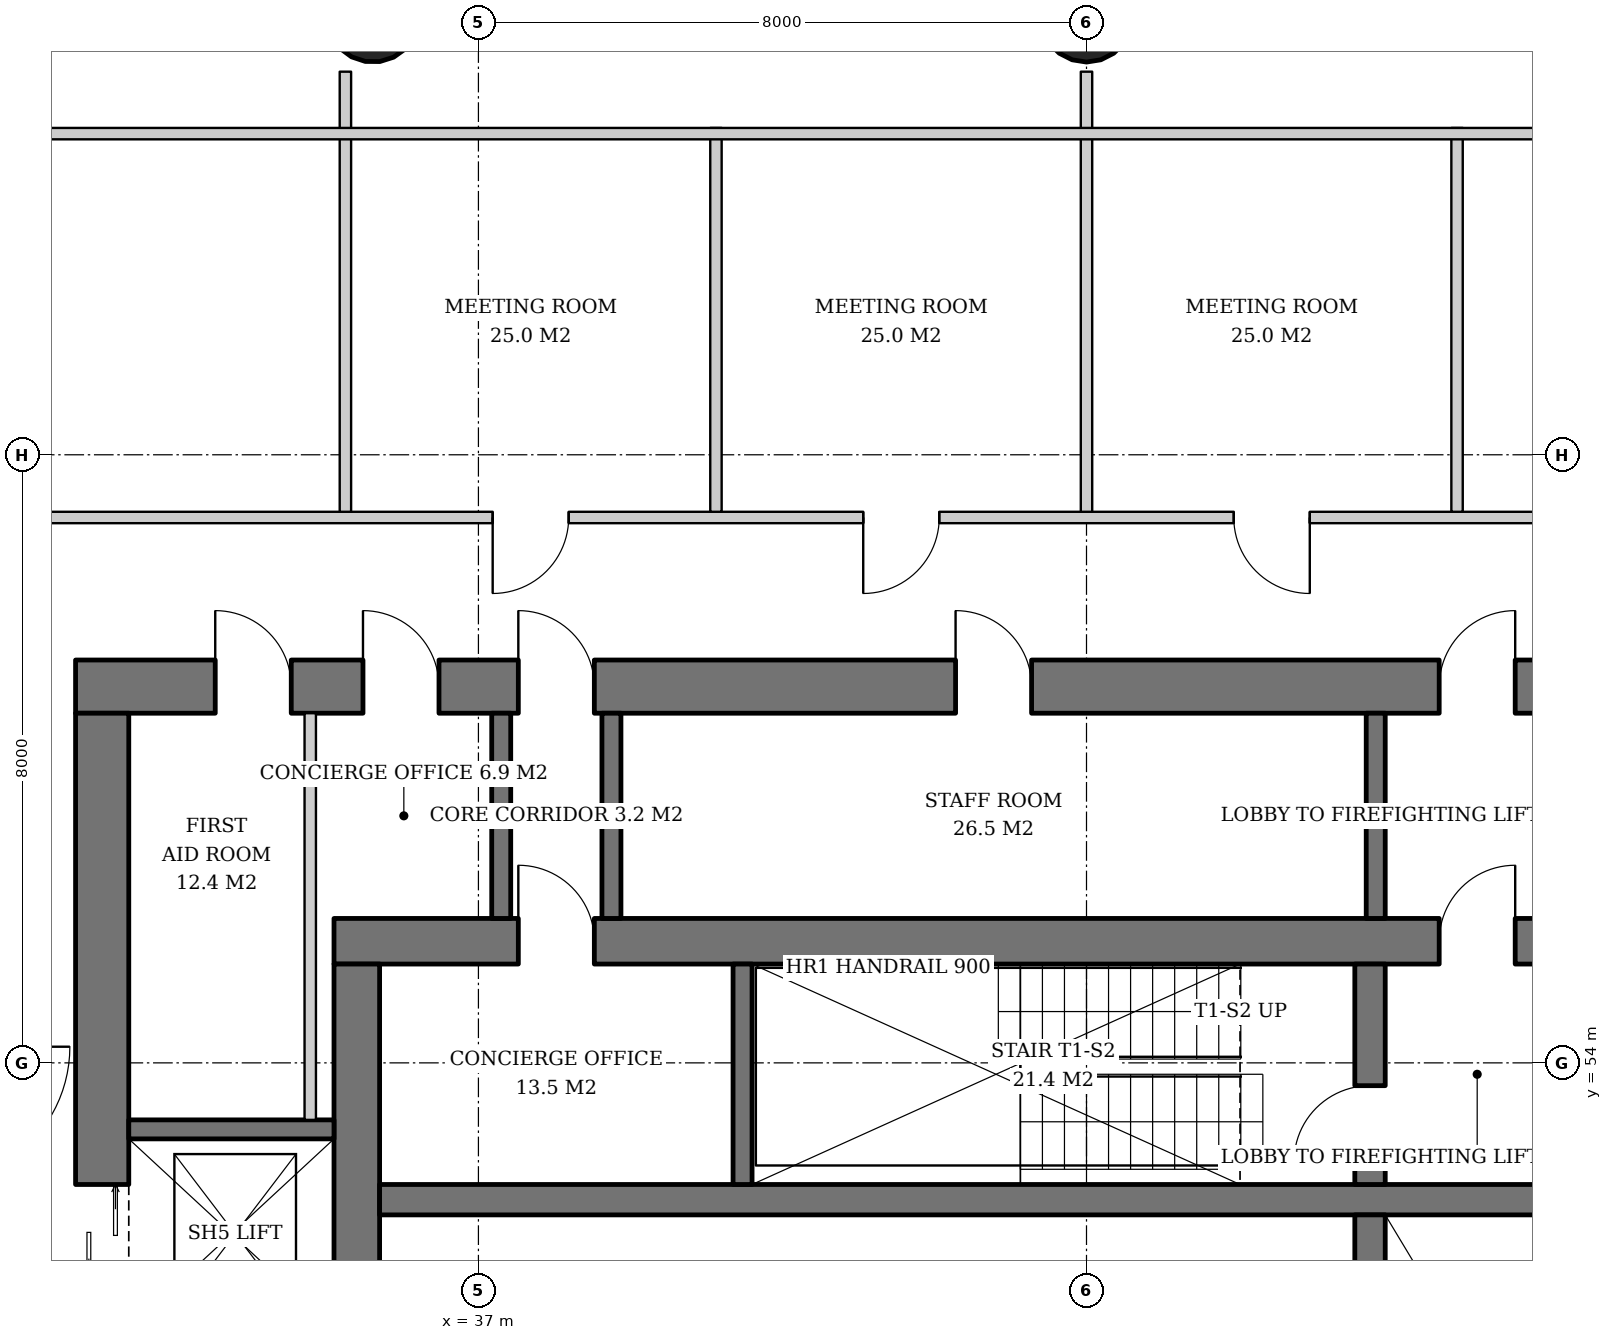
"""IFC4 building model, lengths in metres.
Left out: names, types, materials, properties, quantities, classifications, styles, units other than length and angle.
Written with IfcOpenShell. Run it as: python <this file> out.ifc"""

import sys

from ifc_helpers import new_model, si_unit, direction, frame, frame_2d, origin, origin_2d, place, context, subcontext, project, spatial, rectangle, hollow_circle, extrude, element, fill, save


model = new_model("IFC4")
c1 = context("Model", 3, precision=1e-05, world=origin(), true_north=direction((0.0, 1.0)))
c2 = subcontext(c1, "Body", "Model", "MODEL_VIEW")
j1 = project(units=[si_unit("LENGTHUNIT", "METRE"), si_unit("PLANEANGLEUNIT", "RADIAN")], contexts=[c1])
p1 = place(None, origin())
s1 = spatial("IfcSite", under=j1, at=p1, CompositionType="ELEMENT")
p2 = place(p1, origin())
s2 = spatial("IfcBuilding", under=s1, at=p2, CompositionType="ELEMENT")
p3 = place(p2, frame((0.0, 0.0, 89.4)))
s3 = spatial("IfcBuildingStorey", under=s2, at=p3, CompositionType="ELEMENT", Elevation=89.4)
p4 = place(p3, frame((45.0, 67.814, 0.0), z_axis=(0.0, -0.031914348339, 0.999490607445), x_axis=(1.0, 0.0, 0.0)))
e1 = element("IfcColumn", 1, at=p4, inside=s3, PredefinedType="COLUMN", context=c2, shape_type="SweptSolid", body=[
    extrude(hollow_circle(Radius=0.61, WallThickness=0.04, at=origin_2d()), origin(), (0.0, 0.0, 1.0), 3.802),
])
p5 = place(p3, frame((35.593, 67.814, 0.0), z_axis=(0.015987237665, -0.031910269556, 0.999362868496), x_axis=(0.894067115991, 0.447933021895, 0.0)))
e2 = element("IfcColumn", 2, at=p5, inside=s3, PredefinedType="COLUMN", context=c2, shape_type="SweptSolid", body=[
    extrude(hollow_circle(Radius=0.61, WallThickness=0.04, at=origin_2d()), origin(), (0.0, 0.0, 1.0), 3.802),
])
p6 = place(p3, frame((35.1, 55.6, 0.0), z_axis=(0.0, 0.0, 1.0), x_axis=(1.0, 0.0, 0.0)))
e3 = element("IfcWall", 3, at=p6, inside=s3, PredefinedType="SHEAR", context=c2, shape_type="SweptSolid", body=[
    extrude(rectangle(XDim=19.8, YDim=0.6, at=frame_2d((9.9, 0.0))), origin(), (0.0, 0.0, 1.0), 3.8),
])
p7 = place(p6, frame((14.54, 0.0, 0.0)))
e4 = element("IfcOpeningElement", 4, at=p7, cuts=e3, PredefinedType="OPENING", context=c2, shape_type="SweptSolid", body=[
    extrude(rectangle(XDim=1.0, YDim=2.1, at=frame_2d((0.5, 1.05))), frame((0.0, 0.31, 0.0), z_axis=(0.0, -1.0, 0.0), x_axis=(1.0, 0.0, 0.0)), (0.0, 0.0, 1.0), 0.62),
])
p8 = place(p6, frame((2.425, 0.0, 0.0)))
e5 = element("IfcOpeningElement", 5, at=p8, cuts=e3, PredefinedType="OPENING", context=c2, shape_type="SweptSolid", body=[
    extrude(rectangle(XDim=1.0, YDim=2.1, at=frame_2d((0.5, 1.05))), frame((0.0, 0.31, 0.0), z_axis=(0.0, -1.0, 0.0), x_axis=(1.0, 0.0, 0.0)), (0.0, 0.0, 1.0), 0.62),
])
p9 = place(p3, frame((35.4, 36.7, 0.0), z_axis=(0.0, 0.0, 1.0), x_axis=(0.0, 1.0, 0.0)))
e6 = element("IfcWall", 6, at=p9, inside=s3, PredefinedType="SHEAR", context=c2, shape_type="SweptSolid", body=[
    extrude(rectangle(XDim=18.6, YDim=0.6, at=frame_2d((9.3, 0.0))), origin(), (0.0, 0.0, 1.0), 3.8),
])
p10 = place(p9, frame((8.4, 0.0, 0.0)))
e7 = element("IfcOpeningElement", 7, at=p10, cuts=e6, PredefinedType="OPENING", context=c2, shape_type="SweptSolid", body=[
    extrude(rectangle(XDim=1.8, YDim=2.4, at=frame_2d((0.9, 1.2))), frame((0.0, 0.31, 0.0), z_axis=(0.0, -1.0, 0.0), x_axis=(1.0, 0.0, 0.0)), (0.0, 0.0, 1.0), 0.62),
])
p11 = place(p3, frame((31.7, 58.95, 0.0), z_axis=(0.0, 0.0, 1.0), x_axis=(1.0, 0.0, 0.0)))
e8 = element("IfcWall", 8, at=p11, inside=s3, PredefinedType="SHEAR", context=c2, shape_type="SweptSolid", body=[
    extrude(rectangle(XDim=26.6, YDim=0.7, at=frame_2d((13.3, 0.0))), origin(), (0.0, 0.0, 1.0), 3.8),
])
p12 = place(p11, frame((17.94, 0.0, 0.0)))
e9 = element("IfcOpeningElement", 9, at=p12, cuts=e8, PredefinedType="OPENING", context=c2, shape_type="SweptSolid", body=[
    extrude(rectangle(XDim=1.0, YDim=2.1, at=frame_2d((0.5, 1.05))), frame((0.0, 0.36, 0.0), z_axis=(0.0, -1.0, 0.0), x_axis=(1.0, 0.0, 0.0)), (0.0, 0.0, 1.0), 0.72),
])
p13 = place(p11, frame((5.825, 0.0, 0.0)))
e10 = element("IfcOpeningElement", 10, at=p13, cuts=e8, PredefinedType="OPENING", context=c2, shape_type="SweptSolid", body=[
    extrude(rectangle(XDim=1.0, YDim=2.1, at=frame_2d((0.5, 1.05))), frame((0.0, 0.36, 0.0), z_axis=(0.0, -1.0, 0.0), x_axis=(1.0, 0.0, 0.0)), (0.0, 0.0, 1.0), 0.72),
])
p14 = place(p11, frame((1.837, 0.0, 0.0)))
e11 = element("IfcOpeningElement", 11, at=p14, cuts=e8, PredefinedType="OPENING", context=c2, shape_type="SweptSolid", body=[
    extrude(rectangle(XDim=1.0, YDim=2.1, at=frame_2d((0.5, 1.05))), frame((0.0, 0.36, 0.0), z_axis=(0.0, -1.0, 0.0), x_axis=(1.0, 0.0, 0.0)), (0.0, 0.0, 1.0), 0.72),
])
p15 = place(p11, frame((3.781, 0.0, 0.0)))
e12 = element("IfcOpeningElement", 12, at=p15, cuts=e8, PredefinedType="OPENING", context=c2, shape_type="SweptSolid", body=[
    extrude(rectangle(XDim=1.0, YDim=2.1, at=frame_2d((0.5, 1.05))), frame((0.0, 0.36, 0.0), z_axis=(0.0, -1.0, 0.0), x_axis=(1.0, 0.0, 0.0)), (0.0, 0.0, 1.0), 0.72),
])
p16 = place(p11, frame((11.577, 0.0, 0.0)))
e13 = element("IfcOpeningElement", 13, at=p16, cuts=e8, PredefinedType="OPENING", context=c2, shape_type="SweptSolid", body=[
    extrude(rectangle(XDim=1.0, YDim=2.1, at=frame_2d((0.5, 1.05))), frame((0.0, 0.36, 0.0), z_axis=(0.0, -1.0, 0.0), x_axis=(1.0, 0.0, 0.0)), (0.0, 0.0, 1.0), 0.72),
])
p17 = place(p11, frame((20.9, 0.0, 0.0)))
e14 = element("IfcOpeningElement", 14, at=p17, cuts=e8, PredefinedType="OPENING", context=c2, shape_type="SweptSolid", body=[
    extrude(rectangle(XDim=1.0, YDim=2.1, at=frame_2d((0.5, 1.05))), frame((0.0, 0.36, 0.0), z_axis=(0.0, -1.0, 0.0), x_axis=(1.0, 0.0, 0.0)), (0.0, 0.0, 1.0), 0.72),
])
p18 = place(p11, frame((23.75, 0.0, 0.0)))
e15 = element("IfcOpeningElement", 15, at=p18, cuts=e8, PredefinedType="OPENING", context=c2, shape_type="SweptSolid", body=[
    extrude(rectangle(XDim=1.0, YDim=2.1, at=frame_2d((0.5, 1.05))), frame((0.0, 0.36, 0.0), z_axis=(0.0, -1.0, 0.0), x_axis=(1.0, 0.0, 0.0)), (0.0, 0.0, 1.0), 0.72),
])
p19 = place(p3, frame((32.05, 33.4, 0.0), z_axis=(0.0, 0.0, 1.0), x_axis=(0.0, 1.0, 0.0)))
e16 = element("IfcWall", 16, at=p19, inside=s3, PredefinedType="SHEAR", context=c2, shape_type="SweptSolid", body=[
    extrude(rectangle(XDim=25.2, YDim=0.7, at=frame_2d((12.6, 0.0))), origin(), (0.0, 0.0, 1.0), 3.8),
])
p20 = place(p19, frame((3.45, 0.0, 0.0)))
e17 = element("IfcOpeningElement", 17, at=p20, cuts=e16, PredefinedType="OPENING", context=c2, shape_type="SweptSolid", body=[
    extrude(rectangle(XDim=1.3, YDim=2.2, at=frame_2d((0.65, 1.1))), frame((0.0, 0.36, 0.0), z_axis=(0.0, -1.0, 0.0), x_axis=(1.0, 0.0, 0.0)), (0.0, 0.0, 1.0), 0.72),
])
p21 = place(p19, frame((6.2, 0.0, 0.0)))
e18 = element("IfcOpeningElement", 18, at=p21, cuts=e16, PredefinedType="OPENING", context=c2, shape_type="SweptSolid", body=[
    extrude(rectangle(XDim=1.3, YDim=2.2, at=frame_2d((0.65, 1.1))), frame((0.0, 0.36, 0.0), z_axis=(0.0, -1.0, 0.0), x_axis=(1.0, 0.0, 0.0)), (0.0, 0.0, 1.0), 0.72),
])
p22 = place(p19, frame((8.95, 0.0, 0.0)))
e19 = element("IfcOpeningElement", 19, at=p22, cuts=e16, PredefinedType="OPENING", context=c2, shape_type="SweptSolid", body=[
    extrude(rectangle(XDim=1.3, YDim=2.2, at=frame_2d((0.65, 1.1))), frame((0.0, 0.36, 0.0), z_axis=(0.0, -1.0, 0.0), x_axis=(1.0, 0.0, 0.0)), (0.0, 0.0, 1.0), 0.72),
])
p23 = place(p19, frame((14.95, 0.0, 0.0)))
e20 = element("IfcOpeningElement", 20, at=p23, cuts=e16, PredefinedType="OPENING", context=c2, shape_type="SweptSolid", body=[
    extrude(rectangle(XDim=1.3, YDim=2.2, at=frame_2d((0.65, 1.1))), frame((0.0, 0.36, 0.0), z_axis=(0.0, -1.0, 0.0), x_axis=(1.0, 0.0, 0.0)), (0.0, 0.0, 1.0), 0.72),
])
p24 = place(p19, frame((17.7, 0.0, 0.0)))
e21 = element("IfcOpeningElement", 21, at=p24, cuts=e16, PredefinedType="OPENING", context=c2, shape_type="SweptSolid", body=[
    extrude(rectangle(XDim=1.3, YDim=2.2, at=frame_2d((0.65, 1.1))), frame((0.0, 0.36, 0.0), z_axis=(0.0, -1.0, 0.0), x_axis=(1.0, 0.0, 0.0)), (0.0, 0.0, 1.0), 0.72),
])
p25 = place(p19, frame((11.7, 0.0, 0.0)))
e22 = element("IfcOpeningElement", 22, at=p25, cuts=e16, PredefinedType="OPENING", context=c2, shape_type="SweptSolid", body=[
    extrude(rectangle(XDim=1.8, YDim=2.4, at=frame_2d((0.9, 1.2))), frame((0.0, 0.36, 0.0), z_axis=(0.0, -1.0, 0.0), x_axis=(1.0, 0.0, 0.0)), (0.0, 0.0, 1.0), 0.72),
])
p26 = place(p3, frame((35.7, 52.2, 0.0), z_axis=(0.0, 0.0, 1.0), x_axis=(1.0, 0.0, 0.0)))
e23 = element("IfcWall", 23, at=p26, inside=s3, PredefinedType="SHEAR", context=c2, shape_type="SweptSolid", body=[
    extrude(rectangle(XDim=18.6, YDim=0.4, at=frame_2d((9.3, 0.0))), origin(), (0.0, 0.0, 1.0), 3.8),
])
p27 = place(p3, frame((48.73, 40.0, 0.0), z_axis=(0.0, 0.0, 1.0), x_axis=(0.0, 1.0, 0.0)))
e24 = element("IfcWall", 24, at=p27, inside=s3, PredefinedType="SHEAR", context=c2, shape_type="SweptSolid", body=[
    extrude(rectangle(XDim=12.0, YDim=0.4, at=frame_2d((6.0, 0.0))), origin(), (0.0, 0.0, 1.0), 3.8),
])
p28 = place(p3, frame((48.73, 52.4, 0.0), z_axis=(0.0, 0.0, 1.0), x_axis=(0.0, 1.0, 0.0)))
e25 = element("IfcWall", 25, at=p28, inside=s3, PredefinedType="SHEAR", context=c2, shape_type="SweptSolid", body=[
    extrude(rectangle(XDim=2.9, YDim=0.4, at=frame_2d((1.45, 0.0))), origin(), (0.0, 0.0, 1.0), 3.8),
])
p29 = place(p28, frame((0.3, 0.0, 0.0)))
e26 = element("IfcOpeningElement", 26, at=p29, cuts=e25, PredefinedType="OPENING", context=c2, shape_type="SweptSolid", body=[
    extrude(rectangle(XDim=1.0, YDim=2.1, at=frame_2d((0.5, 1.05))), frame((0.0, 0.21, 0.0), z_axis=(0.0, -1.0, 0.0), x_axis=(1.0, 0.0, 0.0)), (0.0, 0.0, 1.0), 0.42),
])
p30 = place(p3, frame((40.475, 52.4, 0.0), z_axis=(0.0, 0.0, 1.0), x_axis=(0.0, 1.0, 0.0)))
e27 = element("IfcWall", 27, at=p30, inside=s3, PredefinedType="SHEAR", context=c2, shape_type="SweptSolid", body=[
    extrude(rectangle(XDim=2.9, YDim=0.25, at=frame_2d((1.45, 0.0))), origin(), (0.0, 0.0, 1.0), 3.8),
])
p31 = place(p3, frame((32.4, 53.125, 0.0), z_axis=(0.0, 0.0, 1.0), x_axis=(1.0, 0.0, 0.0)))
e28 = element("IfcWall", 28, at=p31, inside=s3, PredefinedType="SHEAR", context=c2, shape_type="SweptSolid", body=[
    extrude(rectangle(XDim=2.7, YDim=0.25, at=frame_2d((1.35, 0.0))), origin(), (0.0, 0.0, 1.0), 3.8),
])
for number, where, z_axis, x_axis in (
    (29, (48.805, 55.9, 0.0), (0.0, 0.0, 1.0), (0.0, 1.0, 0.0)),
    (30, (37.3, 55.9, 0.0), (0.0, 0.0, 1.0), (0.0, 1.0, 0.0)),
    (31, (38.75, 55.9, 0.0), (0.0, 0.0, 1.0), (0.0, 1.0, 0.0)),
):
    element("IfcWall", number, at=place(p3, frame(where, z_axis=z_axis, x_axis=x_axis)), inside=s3, PredefinedType="SOLIDWALL", context=c2, shape_type="SweptSolid", body=[
        extrude(rectangle(XDim=2.7, YDim=0.25, at=frame_2d((1.35, 0.0))), origin(), (0.0, 0.0, 1.0), 3.62),
    ])
p32 = place(p3, frame((34.788, 53.25, 0.0), z_axis=(0.0, 0.0, 1.0), x_axis=(0.0, 1.0, 0.0)))
e32 = element("IfcWall", 32, at=p32, inside=s3, PredefinedType="SOLIDWALL", context=c2, shape_type="SweptSolid", body=[
    extrude(rectangle(XDim=5.35, YDim=0.15, at=frame_2d((2.675, 0.0))), origin(), (0.0, 0.0, 1.0), 3.62),
])
p33 = place(p3, frame((60.25, 61.175, 0.0), z_axis=(0.0, 0.0, 1.0), x_axis=(-1.0, 0.0, 0.0)))
e33 = element("IfcWall", 33, at=p33, inside=s3, PredefinedType="PARTITIONING", context=c2, shape_type="SweptSolid", body=[
    extrude(rectangle(XDim=30.35, YDim=0.15, at=frame_2d((15.175, 0.0))), origin(), (0.0, 0.0, 1.0), 2.612),
])
p34 = place(p33, frame((7.438, 0.0, 0.0)))
e34 = element("IfcOpeningElement", 34, at=p34, cuts=e33, PredefinedType="OPENING", context=c2, shape_type="SweptSolid", body=[
    extrude(rectangle(XDim=1.0, YDim=2.1, at=frame_2d((0.5, 1.05))), frame((0.0, 0.085, 0.0), z_axis=(0.0, -1.0, 0.0), x_axis=(1.0, 0.0, 0.0)), (0.0, 0.0, 1.0), 0.17),
])
p35 = place(p33, frame((12.312, 0.0, 0.0)))
e35 = element("IfcOpeningElement", 35, at=p35, cuts=e33, PredefinedType="OPENING", context=c2, shape_type="SweptSolid", body=[
    extrude(rectangle(XDim=1.0, YDim=2.1, at=frame_2d((0.5, 1.05))), frame((0.0, 0.085, 0.0), z_axis=(0.0, -1.0, 0.0), x_axis=(1.0, 0.0, 0.0)), (0.0, 0.0, 1.0), 0.17),
])
p36 = place(p33, frame((17.188, 0.0, 0.0)))
e36 = element("IfcOpeningElement", 36, at=p36, cuts=e33, PredefinedType="OPENING", context=c2, shape_type="SweptSolid", body=[
    extrude(rectangle(XDim=1.0, YDim=2.1, at=frame_2d((0.5, 1.05))), frame((0.0, 0.085, 0.0), z_axis=(0.0, -1.0, 0.0), x_axis=(1.0, 0.0, 0.0)), (0.0, 0.0, 1.0), 0.17),
])
p37 = place(p33, frame((22.062, 0.0, 0.0)))
e37 = element("IfcOpeningElement", 37, at=p37, cuts=e33, PredefinedType="OPENING", context=c2, shape_type="SweptSolid", body=[
    extrude(rectangle(XDim=1.0, YDim=2.1, at=frame_2d((0.5, 1.05))), frame((0.0, 0.085, 0.0), z_axis=(0.0, -1.0, 0.0), x_axis=(1.0, 0.0, 0.0)), (0.0, 0.0, 1.0), 0.17),
])
p38 = place(p3, frame((49.875, 61.25, 0.0), z_axis=(0.0, 0.0, 1.0), x_axis=(0.0, 1.0, 0.0)))
e38 = element("IfcWall", 38, at=p38, inside=s3, PredefinedType="PARTITIONING", context=c2, shape_type="SweptSolid", body=[
    extrude(rectangle(XDim=5.05, YDim=0.15, at=frame_2d((2.525, 0.0))), origin(), (0.0, 0.0, 1.0), 3.62),
])
p39 = place(p3, frame((45.0, 61.25, 0.0), z_axis=(0.0, 0.0, 1.0), x_axis=(0.0, 1.0, 0.0)))
e39 = element("IfcWall", 39, at=p39, inside=s3, PredefinedType="PARTITIONING", context=c2, shape_type="SweptSolid", body=[
    extrude(rectangle(XDim=5.79, YDim=0.15, at=frame_2d((2.895, 0.0))), origin(), (0.0, 0.0, 1.0), 2.858),
])
p40 = place(p3, frame((40.125, 61.25, 0.0), z_axis=(0.0, 0.0, 1.0), x_axis=(0.0, 1.0, 0.0)))
e40 = element("IfcWall", 40, at=p40, inside=s3, PredefinedType="PARTITIONING", context=c2, shape_type="SweptSolid", body=[
    extrude(rectangle(XDim=5.05, YDim=0.15, at=frame_2d((2.525, 0.0))), origin(), (0.0, 0.0, 1.0), 3.62),
])
p41 = place(p3, frame((35.25, 61.25, 0.0), z_axis=(0.0, 0.0, 1.0), x_axis=(0.0, 1.0, 0.0)))
e41 = element("IfcWall", 41, at=p41, inside=s3, PredefinedType="PARTITIONING", context=c2, shape_type="SweptSolid", body=[
    extrude(rectangle(XDim=5.79, YDim=0.15, at=frame_2d((2.895, 0.0))), origin(), (0.0, 0.0, 1.0), 3.62),
])
p42 = place(p3, frame((27.7, 66.225, 0.0), z_axis=(0.0, 0.0, 1.0), x_axis=(1.0, 0.0, 0.0)))
e42 = element("IfcWall", 42, at=p42, inside=s3, PredefinedType="PARTITIONING", context=c2, shape_type="SweptSolid", body=[
    extrude(rectangle(XDim=34.6, YDim=0.15, at=frame_2d((17.3, 0.0))), origin(), (0.0, 0.0, 1.0), 2.612),
])
p43 = place(p29, origin())
e43 = element("IfcDoor", 43, at=p43, inside=s3, OperationType="SINGLE_SWING_LEFT", PredefinedType="DOOR", context=c2, shape_type="SweptSolid", body=[
    extrude(rectangle(XDim=1.0, YDim=2.1, at=frame_2d((0.5, 1.05))), frame((0.0, 0.025, 0.0), z_axis=(0.0, -1.0, 0.0), x_axis=(1.0, 0.0, 0.0)), (0.0, 0.0, 1.0), 0.05),
])
fill(e26, e43)
p44 = place(p7, origin())
e44 = element("IfcDoor", 44, at=p44, inside=s3, OperationType="SINGLE_SWING_RIGHT", PredefinedType="DOOR", context=c2, shape_type="SweptSolid", body=[
    extrude(rectangle(XDim=1.0, YDim=2.1, at=frame_2d((0.5, 1.05))), frame((0.0, 0.025, 0.0), z_axis=(0.0, -1.0, 0.0), x_axis=(1.0, 0.0, 0.0)), (0.0, 0.0, 1.0), 0.05),
])
fill(e4, e44)
p45 = place(p24, origin())
e45 = element("IfcDoor", 45, at=p45, inside=s3, OperationType="DOUBLE_DOOR_SLIDING", PredefinedType="DOOR", context=c2, shape_type="SweptSolid", body=[
    extrude(rectangle(XDim=1.3, YDim=2.2, at=frame_2d((0.65, 1.1))), frame((0.0, 0.025, 0.0), z_axis=(0.0, -1.0, 0.0), x_axis=(1.0, 0.0, 0.0)), (0.0, 0.0, 1.0), 0.05),
])
fill(e21, e45)
p46 = place(p12, origin())
e46 = element("IfcDoor", 46, at=p46, inside=s3, OperationType="SINGLE_SWING_RIGHT", PredefinedType="DOOR", context=c2, shape_type="SweptSolid", body=[
    extrude(rectangle(XDim=1.0, YDim=2.1, at=frame_2d((0.5, 1.05))), frame((0.0, 0.025, 0.0), z_axis=(0.0, -1.0, 0.0), x_axis=(1.0, 0.0, 0.0)), (0.0, 0.0, 1.0), 0.05),
])
fill(e9, e46)
p47 = place(p13, origin())
e47 = element("IfcDoor", 47, at=p47, inside=s3, OperationType="SINGLE_SWING_LEFT", PredefinedType="DOOR", context=c2, shape_type="SweptSolid", body=[
    extrude(rectangle(XDim=1.0, YDim=2.1, at=frame_2d((0.5, 1.05))), frame((0.0, 0.025, 0.0), z_axis=(0.0, -1.0, 0.0), x_axis=(1.0, 0.0, 0.0)), (0.0, 0.0, 1.0), 0.05),
])
fill(e10, e47)
p48 = place(p8, origin())
e48 = element("IfcDoor", 48, at=p48, inside=s3, OperationType="SINGLE_SWING_LEFT", PredefinedType="DOOR", context=c2, shape_type="SweptSolid", body=[
    extrude(rectangle(XDim=1.0, YDim=2.1, at=frame_2d((0.5, 1.05))), frame((0.0, -0.24, 0.0), z_axis=(0.0, -1.0, 0.0), x_axis=(1.0, 0.0, 0.0)), (0.0, 0.0, 1.0), 0.05),
])
fill(e5, e48)
p49 = place(p14, origin())
e49 = element("IfcDoor", 49, at=p49, inside=s3, OperationType="SINGLE_SWING_LEFT", PredefinedType="DOOR", context=c2, shape_type="SweptSolid", body=[
    extrude(rectangle(XDim=1.0, YDim=2.1, at=frame_2d((0.5, 1.05))), frame((0.0, -0.29, 0.0), z_axis=(0.0, -1.0, 0.0), x_axis=(1.0, 0.0, 0.0)), (0.0, 0.0, 1.0), 0.05),
])
fill(e11, e49)
p50 = place(p15, origin())
e50 = element("IfcDoor", 50, at=p50, inside=s3, OperationType="SINGLE_SWING_LEFT", PredefinedType="DOOR", context=c2, shape_type="SweptSolid", body=[
    extrude(rectangle(XDim=1.0, YDim=2.1, at=frame_2d((0.5, 1.05))), frame((0.0, -0.29, 0.0), z_axis=(0.0, -1.0, 0.0), x_axis=(1.0, 0.0, 0.0)), (0.0, 0.0, 1.0), 0.05),
])
fill(e12, e50)
p51 = place(p16, origin())
e51 = element("IfcDoor", 51, at=p51, inside=s3, OperationType="SINGLE_SWING_LEFT", PredefinedType="DOOR", context=c2, shape_type="SweptSolid", body=[
    extrude(rectangle(XDim=1.0, YDim=2.1, at=frame_2d((0.5, 1.05))), frame((0.0, -0.29, 0.0), z_axis=(0.0, -1.0, 0.0), x_axis=(1.0, 0.0, 0.0)), (0.0, 0.0, 1.0), 0.05),
])
fill(e13, e51)
p52 = place(p35, origin())
e52 = element("IfcDoor", 52, at=p52, inside=s3, OperationType="SINGLE_SWING_LEFT", PredefinedType="DOOR", context=c2, shape_type="SweptSolid", body=[
    extrude(rectangle(XDim=1.0, YDim=2.1, at=frame_2d((0.5, 1.05))), frame((0.0, 0.025, 0.0), z_axis=(0.0, -1.0, 0.0), x_axis=(1.0, 0.0, 0.0)), (0.0, 0.0, 1.0), 0.05),
])
fill(e35, e52)
p53 = place(p36, origin())
e53 = element("IfcDoor", 53, at=p53, inside=s3, OperationType="SINGLE_SWING_RIGHT", PredefinedType="DOOR", context=c2, shape_type="SweptSolid", body=[
    extrude(rectangle(XDim=1.0, YDim=2.1, at=frame_2d((0.5, 1.05))), frame((0.0, 0.025, 0.0), z_axis=(0.0, -1.0, 0.0), x_axis=(1.0, 0.0, 0.0)), (0.0, 0.0, 1.0), 0.05),
])
fill(e36, e53)
p54 = place(p37, origin())
e54 = element("IfcDoor", 54, at=p54, inside=s3, OperationType="SINGLE_SWING_RIGHT", PredefinedType="DOOR", context=c2, shape_type="SweptSolid", body=[
    extrude(rectangle(XDim=1.0, YDim=2.1, at=frame_2d((0.5, 1.05))), frame((0.0, 0.025, 0.0), z_axis=(0.0, -1.0, 0.0), x_axis=(1.0, 0.0, 0.0)), (0.0, 0.0, 1.0), 0.05),
])
fill(e37, e54)
save(model, sys.argv[1])
